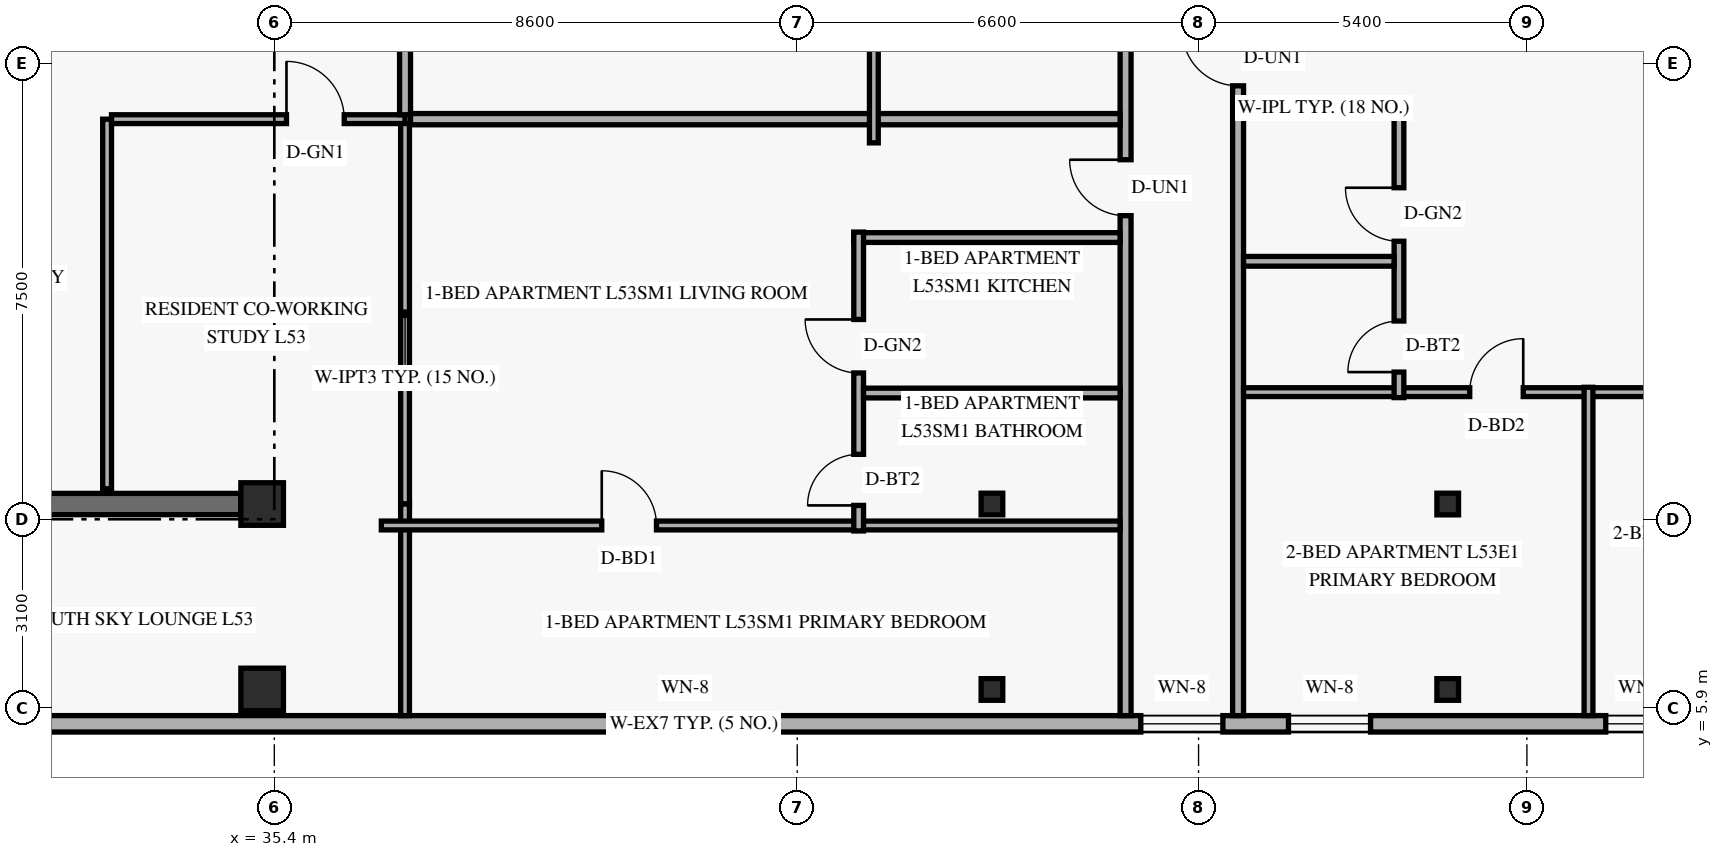
"""IFC4 building model, lengths in metres.
Left out: names, types, materials, properties, quantities, classifications, styles, units other than length and angle.
Written with IfcOpenShell. Run it as: python <this file> out.ifc"""

import sys

from ifc_helpers import new_model, si_unit, direction, frame, frame_2d, origin, origin_2d, place, context, subcontext, project, spatial, rectangle, hollow_rectangle, extrude, element, fill, save


model = new_model("IFC4")
c1 = context("Model", 3, precision=1e-05, world=origin(), true_north=direction((0.0, 1.0)))
c2 = subcontext(c1, "Body", "Model", "MODEL_VIEW")
j1 = project(units=[si_unit("LENGTHUNIT", "METRE"), si_unit("PLANEANGLEUNIT", "RADIAN")], contexts=[c1])
p1 = place(None, origin())
s1 = spatial("IfcSite", under=j1, at=p1, CompositionType="ELEMENT")
p2 = place(p1, origin())
s2 = spatial("IfcBuilding", under=s1, at=p2, CompositionType="ELEMENT")
p3 = place(p2, frame((0.0, 0.0, 205.8)))
s3 = spatial("IfcBuildingStorey", under=s2, at=p3, CompositionType="ELEMENT", Elevation=205.8)
p4 = place(p3, frame((24.55, 9.25, 0.0), z_axis=(0.0, 0.0, 1.0), x_axis=(1.0, 0.0, 0.0)))
e1 = element("IfcWall", 1, at=p4, inside=s3, PredefinedType="SHEAR", context=c2, shape_type="SweptSolid", body=[
    extrude(rectangle(XDim=10.3, YDim=0.35, at=frame_2d((5.15, 0.0))), origin(), (0.0, 0.0, 1.0), 3.36),
])
p5 = place(p4, frame((5.2, 0.0, 0.0)))
e2 = element("IfcOpeningElement", 2, at=p5, cuts=e1, PredefinedType="OPENING", context=c2, shape_type="SweptSolid", body=[
    extrude(rectangle(XDim=0.95, YDim=2.15, at=frame_2d((0.475, 1.075))), frame((0.0, 0.185, 0.0), z_axis=(0.0, -1.0, 0.0), x_axis=(1.0, 0.0, 0.0)), (0.0, 0.0, 1.0), 0.37),
])
for number, where, z_axis, x_axis in (
    (3, (35.2, 6.2, 0.0), (0.0, 0.0, 1.0), (1.0, 0.0, 0.0)),
    (4, (35.2, 9.25, 0.0), (0.0, 0.0, 1.0), (1.0, 0.0, 0.0)),
):
    element("IfcColumn", number, at=place(p3, frame(where, z_axis=z_axis, x_axis=x_axis)), inside=s3, PredefinedType="COLUMN", context=c2, shape_type="SweptSolid", body=[
        extrude(rectangle(XDim=0.7, YDim=0.7, at=origin_2d()), origin(), (0.0, 0.0, 1.0), 3.6),
    ])
for number, where, z_axis, x_axis in (
    (5, (47.139, 6.2, 0.0), (0.035, 0.0, 0.999), (0.0, 1.0, 0.0)),
    (6, (47.139, 9.25, 0.0), (0.035, 0.0, 0.999), (0.0, 1.0, 0.0)),
):
    element("IfcColumn", number, at=place(p3, frame(where, z_axis=z_axis, x_axis=x_axis)), inside=s3, PredefinedType="COLUMN", context=c2, shape_type="SweptSolid", body=[
        extrude(hollow_rectangle(XDim=0.356, YDim=0.356, WallThickness=0.016, at=origin_2d()), origin(), (0.0, 0.0, 1.0), 3.602),
    ])
for number, where, z_axis, x_axis in (
    (7, (54.593, 6.2, 0.0), (0.058, 0.0, 0.998), (0.0, 1.0, 0.0)),
    (8, (54.593, 9.25, 0.0), (0.058, 0.0, 0.998), (0.0, 1.0, 0.0)),
):
    element("IfcColumn", number, at=place(p3, frame(where, z_axis=z_axis, x_axis=x_axis)), inside=s3, PredefinedType="COLUMN", context=c2, shape_type="SweptSolid", body=[
        extrude(hollow_rectangle(XDim=0.356, YDim=0.356, WallThickness=0.016, at=origin_2d()), origin(), (0.0, 0.0, 1.0), 3.606),
    ])
p6 = place(p3, frame((25.82, 5.635, 0.0), z_axis=(0.0, 0.0, 1.0), x_axis=(1.0, 0.0, 0.0)))
e9 = element("IfcWall", 9, at=p6, inside=s3, PredefinedType="SOLIDWALL", context=c2, shape_type="SweptSolid", body=[
    extrude(rectangle(XDim=32.96, YDim=0.27, at=frame_2d((16.48, 0.0))), origin(), (0.0, 0.0, 1.0), 3.36),
])
p7 = place(p6, frame((3.795, 0.0, 0.85)))
e10 = element("IfcOpeningElement", 10, at=p7, cuts=e9, PredefinedType="OPENING", context=c2, shape_type="SweptSolid", body=[
    extrude(rectangle(XDim=1.35, YDim=1.55, at=frame_2d((0.675, 0.775))), frame((0.0, 0.145, 0.0), z_axis=(0.0, -1.0, 0.0), x_axis=(1.0, 0.0, 0.0)), (0.0, 0.0, 1.0), 0.29),
])
p8 = place(p6, frame((15.661, 0.0, 0.85)))
e11 = element("IfcOpeningElement", 11, at=p8, cuts=e9, PredefinedType="OPENING", context=c2, shape_type="SweptSolid", body=[
    extrude(rectangle(XDim=1.35, YDim=1.55, at=frame_2d((0.675, 0.775))), frame((0.0, 0.145, 0.0), z_axis=(0.0, -1.0, 0.0), x_axis=(1.0, 0.0, 0.0)), (0.0, 0.0, 1.0), 0.29),
])
p9 = place(p6, frame((23.83, 0.0, 0.85)))
e12 = element("IfcOpeningElement", 12, at=p9, cuts=e9, PredefinedType="OPENING", context=c2, shape_type="SweptSolid", body=[
    extrude(rectangle(XDim=1.35, YDim=1.55, at=frame_2d((0.675, 0.775))), frame((0.0, 0.145, 0.0), z_axis=(0.0, -1.0, 0.0), x_axis=(1.0, 0.0, 0.0)), (0.0, 0.0, 1.0), 0.29),
])
p10 = place(p6, frame((26.259, 0.0, 0.85)))
e13 = element("IfcOpeningElement", 13, at=p10, cuts=e9, PredefinedType="OPENING", context=c2, shape_type="SweptSolid", body=[
    extrude(rectangle(XDim=1.35, YDim=1.55, at=frame_2d((0.675, 0.775))), frame((0.0, 0.145, 0.0), z_axis=(0.0, -1.0, 0.0), x_axis=(1.0, 0.0, 0.0)), (0.0, 0.0, 1.0), 0.29),
])
p11 = place(p6, frame((31.477, 0.0, 0.85)))
e14 = element("IfcOpeningElement", 14, at=p11, cuts=e9, PredefinedType="OPENING", context=c2, shape_type="SweptSolid", body=[
    extrude(rectangle(XDim=1.2, YDim=1.5, at=frame_2d((0.6, 0.75))), frame((0.0, 0.145, 0.0), z_axis=(0.0, -1.0, 0.0), x_axis=(1.0, 0.0, 0.0)), (0.0, 0.0, 1.0), 0.29),
])
p12 = place(p3, frame((32.65, 9.5, 0.0), z_axis=(0.0, 0.0, 1.0), x_axis=(0.0, 1.0, 0.0)))
e15 = element("IfcWall", 15, at=p12, inside=s3, PredefinedType="PARTITIONING", context=c2, shape_type="SweptSolid", body=[
    extrude(rectangle(XDim=6.08, YDim=0.145, at=frame_2d((3.04, 0.0))), origin(), (0.0, 0.0, 1.0), 3.36),
])
p13 = place(p3, frame((32.722, 15.58, 0.0), z_axis=(0.0, 0.0, 1.0), x_axis=(1.0, 0.0, 0.0)))
e16 = element("IfcWall", 16, at=p13, inside=s3, PredefinedType="PARTITIONING", context=c2, shape_type="SweptSolid", body=[
    extrude(rectangle(XDim=4.828, YDim=0.145, at=frame_2d((2.414, 0.0))), origin(), (0.0, 0.0, 1.0), 2.803),
])
p14 = place(p13, frame((2.877, 0.0, 0.0)))
e17 = element("IfcOpeningElement", 17, at=p14, cuts=e16, PredefinedType="OPENING", context=c2, shape_type="SweptSolid", body=[
    extrude(rectangle(XDim=0.95, YDim=2.15, at=frame_2d((0.475, 1.075))), frame((0.0, 0.083, 0.0), z_axis=(0.0, -1.0, 0.0), x_axis=(1.0, 0.0, 0.0)), (0.0, 0.0, 1.0), 0.165),
])
p15 = place(p3, frame((37.55, 9.25, 0.0), z_axis=(0.0, 0.0, 1.0), x_axis=(0.0, 1.0, 0.0)))
e18 = element("IfcWall", 18, at=p15, inside=s3, PredefinedType="PARTITIONING", context=c2, shape_type="SweptSolid", body=[
    extrude(rectangle(XDim=6.258, YDim=0.145, at=frame_2d((3.129, 0.0))), origin(), (0.0, 0.0, 1.0), 2.803),
])
p16 = place(p3, frame((37.55, 15.653, 0.0), z_axis=(0.0, 0.0, 1.0), x_axis=(0.0, 1.0, 0.0)))
e19 = element("IfcWall", 19, at=p16, inside=s3, PredefinedType="STANDARD", context=c2, shape_type="SweptSolid", body=[
    extrude(rectangle(XDim=7.147, YDim=0.18, at=frame_2d((3.574, 0.0))), origin(), (0.0, 0.0, 1.0), 2.803),
])
p17 = place(p3, frame((49.4, 5.77, 0.0), z_axis=(0.0, 0.0, 1.0), x_axis=(0.0, 1.0, 0.0)))
e20 = element("IfcWall", 20, at=p17, inside=s3, PredefinedType="STANDARD", context=c2, shape_type="SweptSolid", body=[
    extrude(rectangle(XDim=17.03, YDim=0.18, at=frame_2d((8.515, 0.0))), origin(), (0.0, 0.0, 1.0), 2.803),
])
p18 = place(p17, frame((8.223, 0.0, 0.0)))
e21 = element("IfcOpeningElement", 21, at=p18, cuts=e20, PredefinedType="OPENING", context=c2, shape_type="SweptSolid", body=[
    extrude(rectangle(XDim=0.92, YDim=2.15, at=frame_2d((0.46, 1.075))), frame((0.0, 0.1, 0.0), z_axis=(0.0, -1.0, 0.0), x_axis=(1.0, 0.0, 0.0)), (0.0, 0.0, 1.0), 0.2),
])
p19 = place(p3, frame((51.25, 5.77, 0.0), z_axis=(0.0, 0.0, 1.0), x_axis=(0.0, 1.0, 0.0)))
e22 = element("IfcWall", 22, at=p19, inside=s3, PredefinedType="STANDARD", context=c2, shape_type="SweptSolid", body=[
    extrude(rectangle(XDim=36.46, YDim=0.18, at=frame_2d((18.23, 0.0))), origin(), (0.0, 0.0, 1.0), 2.803),
])
p20 = place(p19, frame((10.358, 0.0, 0.0)))
e23 = element("IfcOpeningElement", 23, at=p20, cuts=e22, PredefinedType="OPENING", context=c2, shape_type="SweptSolid", body=[
    extrude(rectangle(XDim=0.92, YDim=2.15, at=frame_2d((0.46, 1.075))), frame((0.0, 0.1, 0.0), z_axis=(0.0, -1.0, 0.0), x_axis=(1.0, 0.0, 0.0)), (0.0, 0.0, 1.0), 0.2),
])
p21 = place(p19, frame((26.583, 0.0, 0.0)))
e24 = element("IfcOpeningElement", 24, at=p21, cuts=e22, PredefinedType="OPENING", context=c2, shape_type="SweptSolid", body=[
    extrude(rectangle(XDim=0.92, YDim=2.15, at=frame_2d((0.46, 1.075))), frame((0.0, 0.1, 0.0), z_axis=(0.0, -1.0, 0.0), x_axis=(1.0, 0.0, 0.0)), (0.0, 0.0, 1.0), 0.2),
])
p22 = place(p3, frame((51.34, 11.09, 0.0), z_axis=(0.0, 0.0, 1.0), x_axis=(1.0, 0.0, 0.0)))
e25 = element("IfcWall", 25, at=p22, inside=s3, PredefinedType="PARTITIONING", context=c2, shape_type="SweptSolid", body=[
    extrude(rectangle(XDim=10.79, YDim=0.145, at=frame_2d((5.395, 0.0))), origin(), (0.0, 0.0, 1.0), 2.879),
])
p23 = place(p22, frame((3.719, 0.0, 0.0)))
e26 = element("IfcOpeningElement", 26, at=p23, cuts=e25, PredefinedType="OPENING", context=c2, shape_type="SweptSolid", body=[
    extrude(rectangle(XDim=0.88, YDim=2.14, at=frame_2d((0.44, 1.07))), frame((0.0, 0.083, 0.0), z_axis=(0.0, -1.0, 0.0), x_axis=(1.0, 0.0, 0.0)), (0.0, 0.0, 1.0), 0.165),
])
p24 = place(p22, frame((7.896, 0.0, 0.0)))
e27 = element("IfcOpeningElement", 27, at=p24, cuts=e25, PredefinedType="OPENING", context=c2, shape_type="SweptSolid", body=[
    extrude(rectangle(XDim=0.88, YDim=2.14, at=frame_2d((0.44, 1.07))), frame((0.0, 0.083, 0.0), z_axis=(0.0, -1.0, 0.0), x_axis=(1.0, 0.0, 0.0)), (0.0, 0.0, 1.0), 0.165),
])
p25 = place(p3, frame((51.34, 15.769, 0.0), z_axis=(0.0, 0.0, 1.0), x_axis=(1.0, 0.0, 0.0)))
e28 = element("IfcWall", 28, at=p25, inside=s3, PredefinedType="PLUMBINGWALL", context=c2, shape_type="SweptSolid", body=[
    extrude(rectangle(XDim=2.636, YDim=0.16, at=frame_2d((1.318, 0.0))), origin(), (0.0, 0.0, 1.0), 3.36),
])
p26 = place(p3, frame((53.896, 11.0, 0.0), z_axis=(0.0, 0.0, 1.0), x_axis=(0.0, 1.0, 0.0)))
e29 = element("IfcWall", 29, at=p26, inside=s3, PredefinedType="PLUMBINGWALL", context=c2, shape_type="SweptSolid", body=[
    extrude(rectangle(XDim=4.858, YDim=0.16, at=frame_2d((2.429, 0.0))), origin(), (0.0, 0.0, 1.0), 3.039),
])
p27 = place(p26, frame((0.42, 0.0, 0.0)))
e30 = element("IfcOpeningElement", 30, at=p27, cuts=e29, PredefinedType="OPENING", context=c2, shape_type="SweptSolid", body=[
    extrude(rectangle(XDim=0.84, YDim=2.12, at=frame_2d((0.42, 1.06))), frame((0.0, 0.09, 0.0), z_axis=(0.0, -1.0, 0.0), x_axis=(1.0, 0.0, 0.0)), (0.0, 0.0, 1.0), 0.18),
])
p28 = place(p26, frame((2.572, 0.0, 0.0)))
e31 = element("IfcOpeningElement", 31, at=p28, cuts=e29, PredefinedType="OPENING", context=c2, shape_type="SweptSolid", body=[
    extrude(rectangle(XDim=0.88, YDim=2.12, at=frame_2d((0.44, 1.06))), frame((0.0, 0.09, 0.0), z_axis=(0.0, -1.0, 0.0), x_axis=(1.0, 0.0, 0.0)), (0.0, 0.0, 1.0), 0.18),
])
p29 = place(p3, frame((51.34, 13.242, 0.0), z_axis=(0.0, 0.0, 1.0), x_axis=(1.0, 0.0, 0.0)))
e32 = element("IfcWall", 32, at=p29, inside=s3, PredefinedType="PLUMBINGWALL", context=c2, shape_type="SweptSolid", body=[
    extrude(rectangle(XDim=2.476, YDim=0.16, at=frame_2d((1.238, 0.0))), origin(), (0.0, 0.0, 1.0), 3.36),
])
p30 = place(p3, frame((57.013, 5.77, 0.0), z_axis=(0.0, 0.0, 1.0), x_axis=(0.0, 1.0, 0.0)))
e33 = element("IfcWall", 33, at=p30, inside=s3, PredefinedType="PARTITIONING", context=c2, shape_type="SweptSolid", body=[
    extrude(rectangle(XDim=5.4, YDim=0.145, at=frame_2d((2.7, 0.0))), origin(), (0.0, 0.0, 1.0), 3.36),
])
p31 = place(p3, frame((37.55, 5.77, 0.0), z_axis=(0.0, 0.0, 1.0), x_axis=(0.0, 1.0, 0.0)))
e34 = element("IfcWall", 34, at=p31, inside=s3, PredefinedType="PARTITIONING", context=c2, shape_type="SweptSolid", body=[
    extrude(rectangle(XDim=3.48, YDim=0.145, at=frame_2d((1.74, 0.0))), origin(), (0.0, 0.0, 1.0), 2.803),
])
p32 = place(p3, frame((37.64, 15.58, 0.0), z_axis=(0.0, 0.0, 1.0), x_axis=(1.0, 0.0, 0.0)))
e35 = element("IfcWall", 35, at=p32, inside=s3, PredefinedType="PARTITIONING", context=c2, shape_type="SweptSolid", body=[
    extrude(rectangle(XDim=11.67, YDim=0.185, at=frame_2d((5.835, 0.0))), origin(), (0.0, 0.0, 1.0), 2.803),
])
p33 = place(p3, frame((37.16, 8.897, 0.0), z_axis=(0.0, 0.0, 1.0), x_axis=(1.0, 0.0, 0.0)))
e36 = element("IfcWall", 36, at=p33, inside=s3, PredefinedType="PARTITIONING", context=c2, shape_type="SweptSolid", body=[
    extrude(rectangle(XDim=12.15, YDim=0.145, at=frame_2d((6.075, 0.0))), origin(), (0.0, 0.0, 1.0), 2.803),
])
p34 = place(p33, frame((3.625, 0.0, 0.0)))
e37 = element("IfcOpeningElement", 37, at=p34, cuts=e36, PredefinedType="OPENING", context=c2, shape_type="SweptSolid", body=[
    extrude(rectangle(XDim=0.9, YDim=2.14, at=frame_2d((0.45, 1.07))), frame((0.0, 0.083, 0.0), z_axis=(0.0, -1.0, 0.0), x_axis=(1.0, 0.0, 0.0)), (0.0, 0.0, 1.0), 0.165),
])
p35 = place(p3, frame((44.93, 13.633, 0.0), z_axis=(0.0, 0.0, 1.0), x_axis=(1.0, 0.0, 0.0)))
e38 = element("IfcWall", 38, at=p35, inside=s3, PredefinedType="PLUMBINGWALL", context=c2, shape_type="SweptSolid", body=[
    extrude(rectangle(XDim=4.38, YDim=0.16, at=frame_2d((2.19, 0.0))), origin(), (0.0, 0.0, 1.0), 2.803),
])
p36 = place(p3, frame((45.01, 8.807, 0.0), z_axis=(0.0, 0.0, 1.0), x_axis=(0.0, 1.0, 0.0)))
e39 = element("IfcWall", 39, at=p36, inside=s3, PredefinedType="PLUMBINGWALL", context=c2, shape_type="SweptSolid", body=[
    extrude(rectangle(XDim=4.916, YDim=0.16, at=frame_2d((2.458, 0.0))), origin(), (0.0, 0.0, 1.0), 2.803),
])
p37 = place(p36, frame((0.42, 0.0, 0.0)))
e40 = element("IfcOpeningElement", 40, at=p37, cuts=e39, PredefinedType="OPENING", context=c2, shape_type="SweptSolid", body=[
    extrude(rectangle(XDim=0.84, YDim=2.12, at=frame_2d((0.42, 1.06))), frame((0.0, 0.09, 0.0), z_axis=(0.0, -1.0, 0.0), x_axis=(1.0, 0.0, 0.0)), (0.0, 0.0, 1.0), 0.18),
])
p38 = place(p36, frame((2.598, 0.0, 0.0)))
e41 = element("IfcOpeningElement", 41, at=p38, cuts=e39, PredefinedType="OPENING", context=c2, shape_type="SweptSolid", body=[
    extrude(rectangle(XDim=0.88, YDim=2.12, at=frame_2d((0.44, 1.06))), frame((0.0, 0.09, 0.0), z_axis=(0.0, -1.0, 0.0), x_axis=(1.0, 0.0, 0.0)), (0.0, 0.0, 1.0), 0.18),
])
p39 = place(p3, frame((45.09, 11.075, 0.0), z_axis=(0.0, 0.0, 1.0), x_axis=(1.0, 0.0, 0.0)))
e42 = element("IfcWall", 42, at=p39, inside=s3, PredefinedType="PLUMBINGWALL", context=c2, shape_type="SweptSolid", body=[
    extrude(rectangle(XDim=4.22, YDim=0.16, at=frame_2d((2.11, 0.0))), origin(), (0.0, 0.0, 1.0), 2.803),
])
p40 = place(p3, frame((45.26, 15.19, 0.0), z_axis=(0.0, 0.0, 1.0), x_axis=(0.0, 1.0, 0.0)))
e43 = element("IfcWall", 43, at=p40, inside=s3, PredefinedType="PARTITIONING", context=c2, shape_type="SweptSolid", body=[
    extrude(rectangle(XDim=7.52, YDim=0.145, at=frame_2d((3.76, 0.0))), origin(), (0.0, 0.0, 1.0), 2.803),
])
p41 = place(p40, frame((2.174, 0.0, 0.0)))
e44 = element("IfcOpeningElement", 44, at=p41, cuts=e43, PredefinedType="OPENING", context=c2, shape_type="SweptSolid", body=[
    extrude(rectangle(XDim=0.88, YDim=2.14, at=frame_2d((0.44, 1.07))), frame((0.0, 0.083, 0.0), z_axis=(0.0, -1.0, 0.0), x_axis=(1.0, 0.0, 0.0)), (0.0, 0.0, 1.0), 0.165),
])
p42 = place(p8, origin())
e45 = element("IfcWindow", 45, at=p42, inside=s3, PartitioningType="SINGLE_PANEL", PredefinedType="WINDOW", context=c2, shape_type="SweptSolid", body=[
    extrude(rectangle(XDim=1.35, YDim=1.55, at=frame_2d((0.675, 0.775))), frame((0.0, 0.03, 0.0), z_axis=(0.0, -1.0, 0.0), x_axis=(1.0, 0.0, 0.0)), (0.0, 0.0, 1.0), 0.06),
])
fill(e11, e45)
p43 = place(p9, origin())
e46 = element("IfcWindow", 46, at=p43, inside=s3, PartitioningType="SINGLE_PANEL", PredefinedType="WINDOW", context=c2, shape_type="SweptSolid", body=[
    extrude(rectangle(XDim=1.35, YDim=1.55, at=frame_2d((0.675, 0.775))), frame((0.0, 0.03, 0.0), z_axis=(0.0, -1.0, 0.0), x_axis=(1.0, 0.0, 0.0)), (0.0, 0.0, 1.0), 0.06),
])
fill(e12, e46)
p44 = place(p10, origin())
e47 = element("IfcWindow", 47, at=p44, inside=s3, PartitioningType="SINGLE_PANEL", PredefinedType="WINDOW", context=c2, shape_type="SweptSolid", body=[
    extrude(rectangle(XDim=1.35, YDim=1.55, at=frame_2d((0.675, 0.775))), frame((0.0, 0.03, 0.0), z_axis=(0.0, -1.0, 0.0), x_axis=(1.0, 0.0, 0.0)), (0.0, 0.0, 1.0), 0.06),
])
fill(e13, e47)
p45 = place(p11, origin())
e48 = element("IfcWindow", 48, at=p45, inside=s3, PartitioningType="SINGLE_PANEL", PredefinedType="WINDOW", context=c2, shape_type="SweptSolid", body=[
    extrude(rectangle(XDim=1.2, YDim=1.5, at=frame_2d((0.6, 0.75))), frame((0.0, 0.03, 0.0), z_axis=(0.0, -1.0, 0.0), x_axis=(1.0, 0.0, 0.0)), (0.0, 0.0, 1.0), 0.06),
])
fill(e14, e48)
p46 = place(p14, origin())
e49 = element("IfcDoor", 49, at=p46, inside=s3, OperationType="SINGLE_SWING_LEFT", PredefinedType="DOOR", context=c2, shape_type="SweptSolid", body=[
    extrude(rectangle(XDim=0.95, YDim=2.15, at=frame_2d((0.475, 1.075))), frame((0.0, 0.025, 0.0), z_axis=(0.0, -1.0, 0.0), x_axis=(1.0, 0.0, 0.0)), (0.0, 0.0, 1.0), 0.05),
])
fill(e17, e49)
p47 = place(p20, origin())
e50 = element("IfcDoor", 50, at=p47, inside=s3, OperationType="SINGLE_SWING_RIGHT", PredefinedType="DOOR", context=c2, shape_type="SweptSolid", body=[
    extrude(rectangle(XDim=0.92, YDim=2.15, at=frame_2d((0.46, 1.075))), frame((0.0, 0.025, 0.0), z_axis=(0.0, -1.0, 0.0), x_axis=(1.0, 0.0, 0.0)), (0.0, 0.0, 1.0), 0.05),
])
fill(e23, e50)
p48 = place(p27, origin())
e51 = element("IfcDoor", 51, at=p48, inside=s3, OperationType="SINGLE_SWING_LEFT", PredefinedType="DOOR", context=c2, shape_type="SweptSolid", body=[
    extrude(rectangle(XDim=0.84, YDim=2.12, at=frame_2d((0.42, 1.06))), frame((0.0, 0.025, 0.0), z_axis=(0.0, -1.0, 0.0), x_axis=(1.0, 0.0, 0.0)), (0.0, 0.0, 1.0), 0.05),
])
fill(e30, e51)
p49 = place(p28, origin())
e52 = element("IfcDoor", 52, at=p49, inside=s3, OperationType="SINGLE_SWING_RIGHT", PredefinedType="DOOR", context=c2, shape_type="SweptSolid", body=[
    extrude(rectangle(XDim=0.88, YDim=2.12, at=frame_2d((0.44, 1.06))), frame((0.0, 0.025, 0.0), z_axis=(0.0, -1.0, 0.0), x_axis=(1.0, 0.0, 0.0)), (0.0, 0.0, 1.0), 0.05),
])
fill(e31, e52)
p50 = place(p23, origin())
e53 = element("IfcDoor", 53, at=p50, inside=s3, OperationType="SINGLE_SWING_RIGHT", PredefinedType="DOOR", context=c2, shape_type="SweptSolid", body=[
    extrude(rectangle(XDim=0.88, YDim=2.14, at=frame_2d((0.44, 1.07))), frame((0.0, 0.025, 0.0), z_axis=(0.0, -1.0, 0.0), x_axis=(1.0, 0.0, 0.0)), (0.0, 0.0, 1.0), 0.05),
])
fill(e26, e53)
p51 = place(p18, origin())
e54 = element("IfcDoor", 54, at=p51, inside=s3, OperationType="SINGLE_SWING_RIGHT", PredefinedType="DOOR", context=c2, shape_type="SweptSolid", body=[
    extrude(rectangle(XDim=0.92, YDim=2.15, at=frame_2d((0.46, 1.075))), frame((0.0, 0.025, 0.0), z_axis=(0.0, -1.0, 0.0), x_axis=(1.0, 0.0, 0.0)), (0.0, 0.0, 1.0), 0.05),
])
fill(e21, e54)
p52 = place(p37, origin())
e55 = element("IfcDoor", 55, at=p52, inside=s3, OperationType="SINGLE_SWING_LEFT", PredefinedType="DOOR", context=c2, shape_type="SweptSolid", body=[
    extrude(rectangle(XDim=0.84, YDim=2.12, at=frame_2d((0.42, 1.06))), frame((0.0, 0.025, 0.0), z_axis=(0.0, -1.0, 0.0), x_axis=(1.0, 0.0, 0.0)), (0.0, 0.0, 1.0), 0.05),
])
fill(e40, e55)
p53 = place(p38, origin())
e56 = element("IfcDoor", 56, at=p53, inside=s3, OperationType="SINGLE_SWING_RIGHT", PredefinedType="DOOR", context=c2, shape_type="SweptSolid", body=[
    extrude(rectangle(XDim=0.88, YDim=2.12, at=frame_2d((0.44, 1.06))), frame((0.0, 0.025, 0.0), z_axis=(0.0, -1.0, 0.0), x_axis=(1.0, 0.0, 0.0)), (0.0, 0.0, 1.0), 0.05),
])
fill(e41, e56)
p54 = place(p34, origin())
e57 = element("IfcDoor", 57, at=p54, inside=s3, OperationType="SINGLE_SWING_LEFT", PredefinedType="DOOR", context=c2, shape_type="SweptSolid", body=[
    extrude(rectangle(XDim=0.9, YDim=2.14, at=frame_2d((0.45, 1.07))), frame((0.0, 0.025, 0.0), z_axis=(0.0, -1.0, 0.0), x_axis=(1.0, 0.0, 0.0)), (0.0, 0.0, 1.0), 0.05),
])
fill(e37, e57)
save(model, sys.argv[1])
